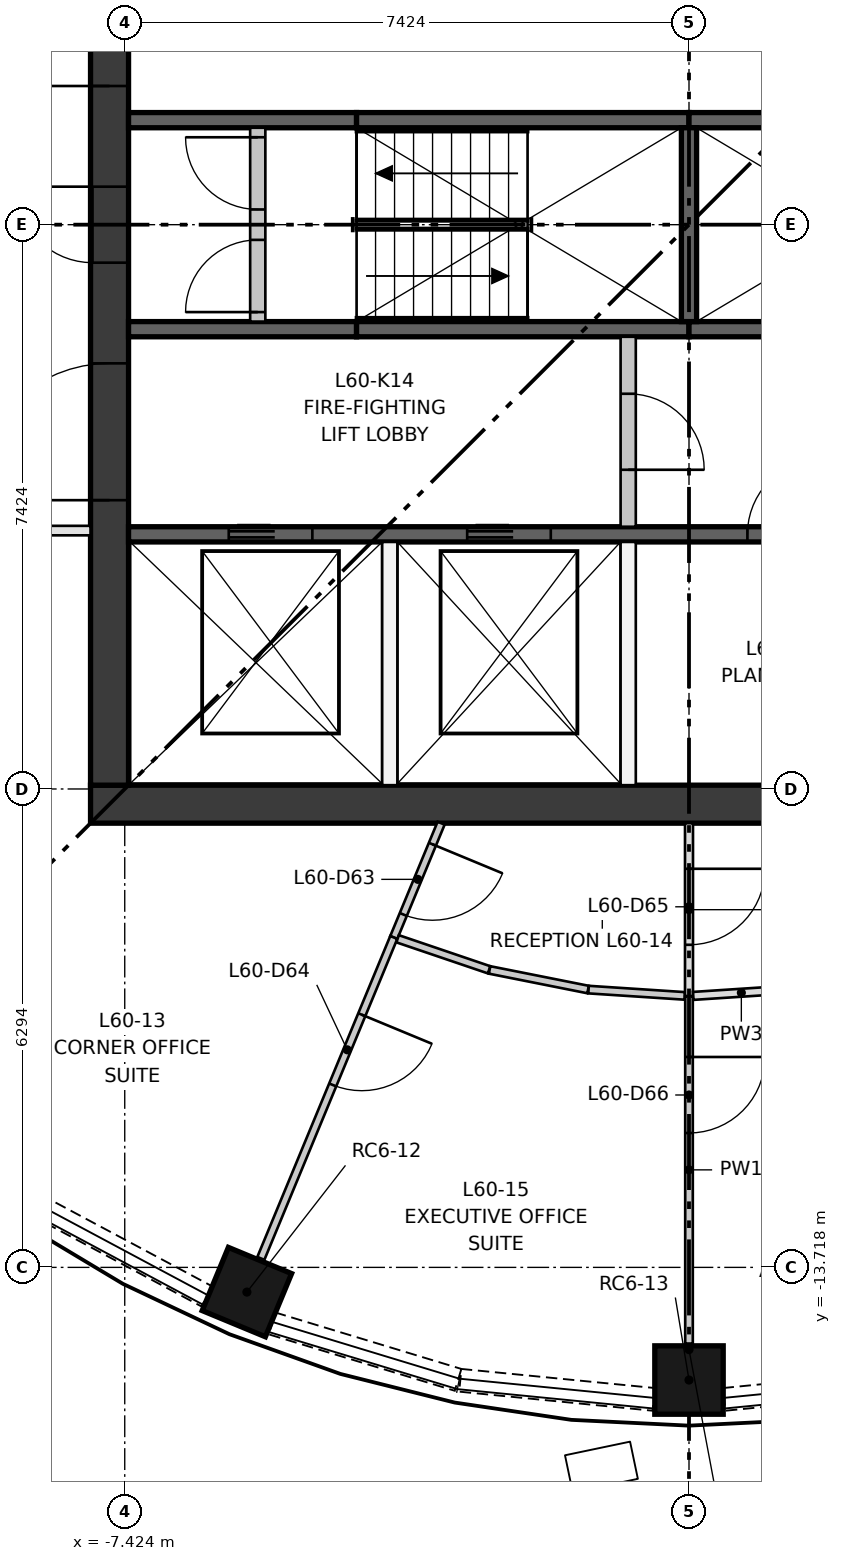
"""IFC4 building model, lengths in metres.
Left out: names, types, materials, properties, quantities, classifications, styles, units other than length and angle.
Written with IfcOpenShell. Run it as: python <this file> out.ifc"""

import sys

from ifc_helpers import new_model, si_unit, direction, frame, frame_2d, origin, origin_2d, place, context, subcontext, project, spatial, rectangle, extrude, element, fill, save


model = new_model("IFC4")
c1 = context("Model", 3, precision=1e-05, world=origin(), true_north=direction((0.0, 1.0)))
c2 = subcontext(c1, "Body", "Model", "MODEL_VIEW")
j1 = project(units=[si_unit("LENGTHUNIT", "METRE"), si_unit("PLANEANGLEUNIT", "RADIAN")], contexts=[c1])
p1 = place(None, origin())
s1 = spatial("IfcSite", under=j1, at=p1, CompositionType="ELEMENT")
p2 = place(p1, origin())
s2 = spatial("IfcBuilding", under=s1, at=p2, CompositionType="ELEMENT")
p3 = place(p2, frame((0.0, 0.0, 221.15)))
s3 = spatial("IfcBuildingStorey", under=s2, at=p3, CompositionType="ELEMENT", Elevation=221.15)
for number, where, z_axis, x_axis in (
    (1, (-5.817, -14.043, 0.0), (0.0, 0.0, 1.0), (-0.383, -0.924, 0.0)),
    (2, (0.0, -15.2, 0.0), (0.0, 0.0, 1.0), (0.0, -1.0, 0.0)),
):
    element("IfcColumn", number, at=place(p3, frame(where, z_axis=z_axis, x_axis=x_axis)), inside=s3, PredefinedType="COLUMN", context=c2, shape_type="SweptSolid", body=[
        extrude(rectangle(XDim=0.9, YDim=0.9, at=origin_2d()), origin(), (0.0, 0.0, 1.0), 2.85),
    ])
p4 = place(p3, frame((-7.874, -7.624, 0.0), z_axis=(0.0, 0.0, 1.0), x_axis=(1.0, 0.0, 0.0)))
e3 = element("IfcWall", 3, at=p4, inside=s3, PredefinedType="SHEAR", context=c2, shape_type="SweptSolid", body=[
    extrude(rectangle(XDim=15.748, YDim=0.5, at=frame_2d((7.874, 0.0))), origin(), (0.0, 0.0, 1.0), 3.35),
])
p5 = place(p3, frame((-7.624, -7.374, 0.0), z_axis=(0.0, 0.0, 1.0), x_axis=(0.0, 1.0, 0.0)))
e4 = element("IfcWall", 4, at=p5, inside=s3, PredefinedType="SHEAR", context=c2, shape_type="SweptSolid", body=[
    extrude(rectangle(XDim=14.748, YDim=0.5, at=frame_2d((7.374, 0.0))), origin(), (0.0, 0.0, 1.0), 3.35),
])
p6 = place(p5, frame((6.874, 0.0, 0.0)))
e5 = element("IfcOpeningElement", 5, at=p6, cuts=e4, PredefinedType="OPENING", context=c2, shape_type="SweptSolid", body=[
    extrude(rectangle(XDim=1.0, YDim=2.1, at=frame_2d((0.5, 1.05))), frame((0.0, 0.26, 0.0), z_axis=(0.0, -1.0, 0.0), x_axis=(1.0, 0.0, 0.0)), (0.0, 0.0, 1.0), 0.52),
])
p7 = place(p5, frame((3.75, 0.0, 0.0)))
e6 = element("IfcOpeningElement", 6, at=p7, cuts=e4, PredefinedType="OPENING", context=c2, shape_type="SweptSolid", body=[
    extrude(rectangle(XDim=1.8, YDim=2.1, at=frame_2d((0.9, 1.05))), frame((0.0, 0.26, 0.0), z_axis=(0.0, -1.0, 0.0), x_axis=(1.0, 0.0, 0.0)), (0.0, 0.0, 1.0), 0.52),
])
p8 = place(p5, frame((9.198, 0.0, 0.0)))
e7 = element("IfcOpeningElement", 7, at=p8, cuts=e4, PredefinedType="OPENING", context=c2, shape_type="SweptSolid", body=[
    extrude(rectangle(XDim=1.8, YDim=2.1, at=frame_2d((0.9, 1.05))), frame((0.0, 0.26, 0.0), z_axis=(0.0, -1.0, 0.0), x_axis=(1.0, 0.0, 0.0)), (0.0, 0.0, 1.0), 0.52),
])
p9 = place(p3, frame((-7.374, -4.074, 0.0), z_axis=(0.0, 0.0, 1.0), x_axis=(1.0, 0.0, 0.0)))
e8 = element("IfcWall", 8, at=p9, inside=s3, PredefinedType="SHEAR", context=c2, shape_type="SweptSolid", body=[
    extrude(rectangle(XDim=14.748, YDim=0.2, at=frame_2d((7.374, 0.0))), origin(), (0.0, 0.0, 1.0), 3.0),
])
p10 = place(p9, frame((1.319, 0.0, 0.0)))
e9 = element("IfcOpeningElement", 9, at=p10, cuts=e8, PredefinedType="OPENING", context=c2, shape_type="SweptSolid", body=[
    extrude(rectangle(XDim=1.1, YDim=2.1, at=frame_2d((0.55, 1.05))), frame((0.0, 0.11, 0.0), z_axis=(0.0, -1.0, 0.0), x_axis=(1.0, 0.0, 0.0)), (0.0, 0.0, 1.0), 0.22),
])
p11 = place(p9, frame((4.456, 0.0, 0.0)))
e10 = element("IfcOpeningElement", 10, at=p11, cuts=e8, PredefinedType="OPENING", context=c2, shape_type="SweptSolid", body=[
    extrude(rectangle(XDim=1.1, YDim=2.1, at=frame_2d((0.55, 1.05))), frame((0.0, 0.11, 0.0), z_axis=(0.0, -1.0, 0.0), x_axis=(1.0, 0.0, 0.0)), (0.0, 0.0, 1.0), 0.22),
])
p12 = place(p9, frame((8.143, 0.0, 0.0)))
e11 = element("IfcOpeningElement", 11, at=p12, cuts=e8, PredefinedType="OPENING", context=c2, shape_type="SweptSolid", body=[
    extrude(rectangle(XDim=1.0, YDim=2.1, at=frame_2d((0.5, 1.05))), frame((0.0, 0.11, 0.0), z_axis=(0.0, -1.0, 0.0), x_axis=(1.0, 0.0, 0.0)), (0.0, 0.0, 1.0), 0.22),
])
p13 = place(p9, frame((12.379, 0.0, 0.0)))
e12 = element("IfcOpeningElement", 12, at=p13, cuts=e8, PredefinedType="OPENING", context=c2, shape_type="SweptSolid", body=[
    extrude(rectangle(XDim=0.8, YDim=2.1, at=frame_2d((0.4, 1.05))), frame((0.0, 0.11, 0.0), z_axis=(0.0, -1.0, 0.0), x_axis=(1.0, 0.0, 0.0)), (0.0, 0.0, 1.0), 0.22),
])
p14 = place(p3, frame((-7.374, -1.375, 0.0), z_axis=(0.0, 0.0, 1.0), x_axis=(1.0, 0.0, 0.0)))
e13 = element("IfcWall", 13, at=p14, inside=s3, PredefinedType="SHEAR", context=c2, shape_type="SweptSolid", body=[
    extrude(rectangle(XDim=3.0, YDim=0.2, at=frame_2d((1.5, 0.0))), origin(), (0.0, 0.0, 1.0), 3.0),
])
for number, where, z_axis, x_axis in (
    (14, (-4.374, -1.375, 0.0), (0.0, 0.0, 1.0), (1.0, 0.0, 0.0)),
    (15, (0.0, -1.375, 0.0), (0.0, 0.0, 1.0), (1.0, 0.0, 0.0)),
):
    element("IfcWall", number, at=place(p3, frame(where, z_axis=z_axis, x_axis=x_axis)), inside=s3, PredefinedType="SHEAR", context=c2, shape_type="SweptSolid", body=[
        extrude(rectangle(XDim=4.374, YDim=0.2, at=frame_2d((2.187, 0.0))), origin(), (0.0, 0.0, 1.0), 3.0),
    ])
p15 = place(p3, frame((-7.374, 1.375, 0.0), z_axis=(0.0, 0.0, 1.0), x_axis=(1.0, 0.0, 0.0)))
e16 = element("IfcWall", 16, at=p15, inside=s3, PredefinedType="SHEAR", context=c2, shape_type="SweptSolid", body=[
    extrude(rectangle(XDim=3.0, YDim=0.2, at=frame_2d((1.5, 0.0))), origin(), (0.0, 0.0, 1.0), 3.0),
])
for number, where, z_axis, x_axis in (
    (17, (-4.374, 1.375, 0.0), (0.0, 0.0, 1.0), (1.0, 0.0, 0.0)),
    (18, (0.0, 1.375, 0.0), (0.0, 0.0, 1.0), (1.0, 0.0, 0.0)),
):
    element("IfcWall", number, at=place(p3, frame(where, z_axis=z_axis, x_axis=x_axis)), inside=s3, PredefinedType="SHEAR", context=c2, shape_type="SweptSolid", body=[
        extrude(rectangle(XDim=4.374, YDim=0.2, at=frame_2d((2.187, 0.0))), origin(), (0.0, 0.0, 1.0), 3.0),
    ])
p16 = place(p3, frame((0.0, -1.275, 0.0), z_axis=(0.0, 0.0, 1.0), x_axis=(0.0, 1.0, 0.0)))
e19 = element("IfcWall", 19, at=p16, inside=s3, PredefinedType="SHEAR", context=c2, shape_type="SweptSolid", body=[
    extrude(rectangle(XDim=2.55, YDim=0.2, at=frame_2d((1.275, 0.0))), origin(), (0.0, 0.0, 1.0), 3.0),
])
for number, where, z_axis, x_axis in (
    (20, (-3.937, -7.374, 0.0), (0.0, 0.0, 1.0), (0.0, 1.0, 0.0)),
    (21, (-0.8, -7.374, 0.0), (0.0, 0.0, 1.0), (0.0, 1.0, 0.0)),
):
    element("IfcWall", number, at=place(p3, frame(where, z_axis=z_axis, x_axis=x_axis)), inside=s3, PredefinedType="PARTITIONING", context=c2, shape_type="SweptSolid", body=[
        extrude(rectangle(XDim=3.2, YDim=0.2, at=frame_2d((1.6, 0.0))), origin(), (0.0, 0.0, 1.0), 3.0),
    ])
p17 = place(p3, frame((-0.8, -3.974, 0.0), z_axis=(0.0, 0.0, 1.0), x_axis=(0.0, 1.0, 0.0)))
e22 = element("IfcWall", 22, at=p17, inside=s3, PredefinedType="PARTITIONING", context=c2, shape_type="SweptSolid", body=[
    extrude(rectangle(XDim=2.499, YDim=0.2, at=frame_2d((1.25, 0.0))), origin(), (0.0, 0.0, 1.0), 3.0),
])
p18 = place(p17, frame((0.75, 0.0, 0.0)))
e23 = element("IfcOpeningElement", 23, at=p18, cuts=e22, PredefinedType="OPENING", context=c2, shape_type="SweptSolid", body=[
    extrude(rectangle(XDim=1.0, YDim=2.1, at=frame_2d((0.5, 1.05))), frame((0.0, 0.11, 0.0), z_axis=(0.0, -1.0, 0.0), x_axis=(1.0, 0.0, 0.0)), (0.0, 0.0, 1.0), 0.22),
])
p19 = place(p3, frame((-5.674, -1.275, 0.0), z_axis=(0.0, 0.0, 1.0), x_axis=(0.0, 1.0, 0.0)))
e24 = element("IfcWall", 24, at=p19, inside=s3, PredefinedType="PARTITIONING", context=c2, shape_type="SweptSolid", body=[
    extrude(rectangle(XDim=2.55, YDim=0.2, at=frame_2d((1.275, 0.0))), origin(), (0.0, 0.0, 1.0), 3.0),
])
p20 = place(p19, frame((0.125, 0.0, 0.0)))
e25 = element("IfcOpeningElement", 25, at=p20, cuts=e24, PredefinedType="OPENING", context=c2, shape_type="SweptSolid", body=[
    extrude(rectangle(XDim=0.95, YDim=2.1, at=frame_2d((0.475, 1.05))), frame((0.0, 0.11, 0.0), z_axis=(0.0, -1.0, 0.0), x_axis=(1.0, 0.0, 0.0)), (0.0, 0.0, 1.0), 0.22),
])
p21 = place(p19, frame((1.475, 0.0, 0.0)))
e26 = element("IfcOpeningElement", 26, at=p21, cuts=e24, PredefinedType="OPENING", context=c2, shape_type="SweptSolid", body=[
    extrude(rectangle(XDim=0.95, YDim=2.1, at=frame_2d((0.475, 1.05))), frame((0.0, 0.11, 0.0), z_axis=(0.0, -1.0, 0.0), x_axis=(1.0, 0.0, 0.0)), (0.0, 0.0, 1.0), 0.22),
])
p22 = place(p3, frame((-8.598, -12.894, 0.0), z_axis=(0.0, 0.0, 1.0), x_axis=(0.881810499649, -0.471603904468, 0.0)))
e27 = element("IfcWall", 27, at=p22, inside=s3, PredefinedType="SOLIDWALL", context=c2, shape_type="SweptSolid", body=[
    extrude(rectangle(XDim=2.557, YDim=0.3, at=frame_2d((1.278, 0.0))), origin(), (0.0, 0.0, 1.0), 0.9),
])
p23 = place(p3, frame((-5.486, -14.455, 0.0), z_axis=(0.0, 0.0, 1.0), x_axis=(0.956960147557, -0.290219358397, 0.0)))
e28 = element("IfcWall", 28, at=p23, inside=s3, PredefinedType="SOLIDWALL", context=c2, shape_type="SweptSolid", body=[
    extrude(rectangle(XDim=2.557, YDim=0.3, at=frame_2d((1.279, 0.0))), origin(), (0.0, 0.0, 1.0), 0.9),
])
for number, where, z_axis, x_axis in (
    (29, (-3.009, -15.204, 0.0), (0.0, 0.0, 1.0), (0.995, -0.098, 0.0)),
    (30, (0.464, -15.455, 0.0), (0.0, 0.0, 1.0), (0.995, 0.098, 0.0)),
):
    element("IfcWall", number, at=place(p3, frame(where, z_axis=z_axis, x_axis=x_axis)), inside=s3, PredefinedType="SOLIDWALL", context=c2, shape_type="SweptSolid", body=[
        extrude(rectangle(XDim=2.558, YDim=0.3, at=frame_2d((1.279, 0.0))), origin(), (0.0, 0.0, 1.0), 0.9),
    ])
p24 = place(p3, frame((-7.874, -4.024, 0.0), z_axis=(0.0, 0.0, 1.0), x_axis=(-1.0, 0.0, 0.0)))
e31 = element("IfcWall", 31, at=p24, inside=s3, PredefinedType="PARTITIONING", context=c2, shape_type="SweptSolid", body=[
    extrude(rectangle(XDim=2.422, YDim=0.125, at=frame_2d((1.211, 0.0))), origin(), (0.0, 0.0, 1.0), 3.0),
])
p25 = place(p24, frame((0.7, 0.0, 0.0)))
e32 = element("IfcOpeningElement", 32, at=p25, cuts=e31, PredefinedType="OPENING", context=c2, shape_type="SweptSolid", body=[
    extrude(rectangle(XDim=1.0, YDim=2.1, at=frame_2d((0.5, 1.05))), frame((0.0, 0.073, 0.0), z_axis=(0.0, -1.0, 0.0), x_axis=(1.0, 0.0, 0.0)), (0.0, 0.0, 1.0), 0.145),
])
p26 = place(p3, frame((-3.261, -7.874, 0.0), z_axis=(0.0, 0.0, 1.0), x_axis=(-0.382718376354, -0.923865057463, 0.0)))
e33 = element("IfcWall", 33, at=p26, inside=s3, PredefinedType="PARTITIONING", context=c2, shape_type="SweptSolid", body=[
    extrude(rectangle(XDim=1.627, YDim=0.1, at=frame_2d((0.813, 0.0))), origin(), (0.0, 0.0, 1.0), 3.0),
])
p27 = place(p26, frame((0.3, 0.0, 0.0)))
e34 = element("IfcOpeningElement", 34, at=p27, cuts=e33, PredefinedType="OPENING", context=c2, shape_type="SweptSolid", body=[
    extrude(rectangle(XDim=1.0, YDim=2.1, at=frame_2d((0.5, 1.05))), frame((0.0, 0.06, 0.0), z_axis=(0.0, -1.0, 0.0), x_axis=(1.0, 0.0, 0.0)), (0.0, 0.0, 1.0), 0.12),
])
p28 = place(p3, frame((-3.884, -9.377, 0.0), z_axis=(0.0, 0.0, 1.0), x_axis=(-0.382664766489, -0.923887263949, 0.0)))
e35 = element("IfcWall", 35, at=p28, inside=s3, PredefinedType="PARTITIONING", context=c2, shape_type="SweptSolid", body=[
    extrude(rectangle(XDim=4.57, YDim=0.1, at=frame_2d((2.285, 0.0))), origin(), (0.0, 0.0, 1.0), 3.0),
])
p29 = place(p28, frame((1.1, 0.0, 0.0)))
e36 = element("IfcOpeningElement", 36, at=p29, cuts=e35, PredefinedType="OPENING", context=c2, shape_type="SweptSolid", body=[
    extrude(rectangle(XDim=1.0, YDim=2.1, at=frame_2d((0.5, 1.05))), frame((0.0, 0.06, 0.0), z_axis=(0.0, -1.0, 0.0), x_axis=(1.0, 0.0, 0.0)), (0.0, 0.0, 1.0), 0.12),
])
p30 = place(p3, frame((-2.63, -9.803, 0.0), z_axis=(0.0, 0.0, 1.0), x_axis=(-0.946940072487, 0.321410172706, 0.0)))
e37 = element("IfcWall", 37, at=p30, inside=s3, PredefinedType="PARTITIONING", context=c2, shape_type="SweptSolid", body=[
    extrude(rectangle(XDim=1.271, YDim=0.1, at=frame_2d((0.635, 0.0))), origin(), (0.0, 0.0, 1.0), 3.0),
])
p31 = place(p3, frame((-1.328, -10.062, 0.0), z_axis=(0.0, 0.0, 1.0), x_axis=(-0.980779158075, 0.195121098517, 0.0)))
e38 = element("IfcWall", 38, at=p31, inside=s3, PredefinedType="PARTITIONING", context=c2, shape_type="SweptSolid", body=[
    extrude(rectangle(XDim=1.321, YDim=0.1, at=frame_2d((0.661, 0.0))), origin(), (0.0, 0.0, 1.0), 3.0),
])
p32 = place(p3, frame((-0.056, -10.146, 0.0), z_axis=(0.0, 0.0, 1.0), x_axis=(-0.997868677089, 0.065254143814, 0.0)))
e39 = element("IfcWall", 39, at=p32, inside=s3, PredefinedType="PARTITIONING", context=c2, shape_type="SweptSolid", body=[
    extrude(rectangle(XDim=1.268, YDim=0.1, at=frame_2d((0.634, 0.0))), origin(), (0.0, 0.0, 1.0), 3.0),
])
p33 = place(p3, frame((0.0, -7.874, 0.0), z_axis=(0.0, 0.0, 1.0), x_axis=(0.0, -1.0, 0.0)))
e40 = element("IfcWall", 40, at=p33, inside=s3, PredefinedType="PARTITIONING", context=c2, shape_type="SweptSolid", body=[
    extrude(rectangle(XDim=2.276, YDim=0.105, at=frame_2d((1.138, 0.0))), origin(), (0.0, 0.0, 1.0), 3.0),
])
p34 = place(p33, frame((0.6, 0.0, 0.0)))
e41 = element("IfcOpeningElement", 41, at=p34, cuts=e40, PredefinedType="OPENING", context=c2, shape_type="SweptSolid", body=[
    extrude(rectangle(XDim=1.0, YDim=2.1, at=frame_2d((0.5, 1.05))), frame((0.0, 0.062, 0.0), z_axis=(0.0, -1.0, 0.0), x_axis=(1.0, 0.0, 0.0)), (0.0, 0.0, 1.0), 0.125),
])
p35 = place(p3, frame((0.0, -10.15, 0.0), z_axis=(0.0, 0.0, 1.0), x_axis=(0.0, -1.0, 0.0)))
e42 = element("IfcWall", 42, at=p35, inside=s3, PredefinedType="PARTITIONING", context=c2, shape_type="SweptSolid", body=[
    extrude(rectangle(XDim=4.57, YDim=0.1, at=frame_2d((2.285, 0.0))), origin(), (0.0, 0.0, 1.0), 3.0),
])
p36 = place(p35, frame((0.8, 0.0, 0.0)))
e43 = element("IfcOpeningElement", 43, at=p36, cuts=e42, PredefinedType="OPENING", context=c2, shape_type="SweptSolid", body=[
    extrude(rectangle(XDim=1.0, YDim=2.1, at=frame_2d((0.5, 1.05))), frame((0.0, 0.06, 0.0), z_axis=(0.0, -1.0, 0.0), x_axis=(1.0, 0.0, 0.0)), (0.0, 0.0, 1.0), 0.12),
])
p37 = place(p3, frame((1.321, -10.063, 0.0), z_axis=(0.0, 0.0, 1.0), x_axis=(-0.99786785721, -0.065266680223, 0.0)))
e44 = element("IfcWall", 44, at=p37, inside=s3, PredefinedType="PARTITIONING", context=c2, shape_type="SweptSolid", body=[
    extrude(rectangle(XDim=1.268, YDim=0.105, at=frame_2d((0.634, 0.0))), origin(), (0.0, 0.0, 1.0), 3.0),
])
p38 = place(p10, origin())
e45 = element("IfcDoor", 45, at=p38, inside=s3, OperationType="DOUBLE_DOOR_SLIDING", PredefinedType="DOOR", context=c2, shape_type="SweptSolid", body=[
    extrude(rectangle(XDim=1.1, YDim=2.1, at=frame_2d((0.55, 1.05))), frame((0.0, 0.025, 0.0), z_axis=(0.0, -1.0, 0.0), x_axis=(1.0, 0.0, 0.0)), (0.0, 0.0, 1.0), 0.05),
])
fill(e9, e45)
p39 = place(p11, origin())
e46 = element("IfcDoor", 46, at=p39, inside=s3, OperationType="DOUBLE_DOOR_SLIDING", PredefinedType="DOOR", context=c2, shape_type="SweptSolid", body=[
    extrude(rectangle(XDim=1.1, YDim=2.1, at=frame_2d((0.55, 1.05))), frame((0.0, 0.025, 0.0), z_axis=(0.0, -1.0, 0.0), x_axis=(1.0, 0.0, 0.0)), (0.0, 0.0, 1.0), 0.05),
])
fill(e10, e46)
p40 = place(p20, origin())
e47 = element("IfcDoor", 47, at=p40, inside=s3, OperationType="SINGLE_SWING_LEFT", PredefinedType="DOOR", context=c2, shape_type="SweptSolid", body=[
    extrude(rectangle(XDim=0.95, YDim=2.1, at=frame_2d((0.475, 1.05))), frame((0.0, 0.025, 0.0), z_axis=(0.0, -1.0, 0.0), x_axis=(1.0, 0.0, 0.0)), (0.0, 0.0, 1.0), 0.05),
])
fill(e25, e47)
p41 = place(p21, origin())
e48 = element("IfcDoor", 48, at=p41, inside=s3, OperationType="SINGLE_SWING_RIGHT", PredefinedType="DOOR", context=c2, shape_type="SweptSolid", body=[
    extrude(rectangle(XDim=0.95, YDim=2.1, at=frame_2d((0.475, 1.05))), frame((0.0, 0.025, 0.0), z_axis=(0.0, -1.0, 0.0), x_axis=(1.0, 0.0, 0.0)), (0.0, 0.0, 1.0), 0.05),
])
fill(e26, e48)
p42 = place(p18, frame((1.0, 0.0, 0.0), z_axis=(0.0, 0.0, 1.0), x_axis=(-1.0, 0.0, 0.0)))
e49 = element("IfcDoor", 49, at=p42, inside=s3, OperationType="SINGLE_SWING_LEFT", PredefinedType="DOOR", context=c2, shape_type="SweptSolid", body=[
    extrude(rectangle(XDim=1.0, YDim=2.1, at=frame_2d((0.5, 1.05))), frame((0.0, 0.025, 0.0), z_axis=(0.0, -1.0, 0.0), x_axis=(1.0, 0.0, 0.0)), (0.0, 0.0, 1.0), 0.05),
])
fill(e23, e49)
p43 = place(p12, origin())
e50 = element("IfcDoor", 50, at=p43, inside=s3, OperationType="SINGLE_SWING_RIGHT", PredefinedType="DOOR", context=c2, shape_type="SweptSolid", body=[
    extrude(rectangle(XDim=1.0, YDim=2.1, at=frame_2d((0.5, 1.05))), frame((0.0, 0.025, 0.0), z_axis=(0.0, -1.0, 0.0), x_axis=(1.0, 0.0, 0.0)), (0.0, 0.0, 1.0), 0.05),
])
fill(e11, e50)
p44 = place(p6, origin())
e51 = element("IfcDoor", 51, at=p44, inside=s3, OperationType="SINGLE_SWING_RIGHT", PredefinedType="DOOR", context=c2, shape_type="SweptSolid", body=[
    extrude(rectangle(XDim=1.0, YDim=2.1, at=frame_2d((0.5, 1.05))), frame((0.0, 0.25, 0.0), z_axis=(0.0, -1.0, 0.0), x_axis=(1.0, 0.0, 0.0)), (0.0, 0.0, 1.0), 0.05),
])
fill(e5, e51)
p45 = place(p7, origin())
e52 = element("IfcDoor", 52, at=p45, inside=s3, OperationType="DOUBLE_DOOR_SINGLE_SWING", PredefinedType="DOOR", context=c2, shape_type="SweptSolid", body=[
    extrude(rectangle(XDim=1.8, YDim=2.1, at=frame_2d((0.9, 1.05))), frame((0.0, 0.025, 0.0), z_axis=(0.0, -1.0, 0.0), x_axis=(1.0, 0.0, 0.0)), (0.0, 0.0, 1.0), 0.05),
])
fill(e6, e52)
p46 = place(p8, origin())
e53 = element("IfcDoor", 53, at=p46, inside=s3, OperationType="DOUBLE_DOOR_SINGLE_SWING", PredefinedType="DOOR", context=c2, shape_type="SweptSolid", body=[
    extrude(rectangle(XDim=1.8, YDim=2.1, at=frame_2d((0.9, 1.05))), frame((0.0, 0.025, 0.0), z_axis=(0.0, -1.0, 0.0), x_axis=(1.0, 0.0, 0.0)), (0.0, 0.0, 1.0), 0.05),
])
fill(e7, e53)
p47 = place(p27, origin())
e54 = element("IfcDoor", 54, at=p47, inside=s3, OperationType="SINGLE_SWING_LEFT", PredefinedType="DOOR", context=c2, shape_type="SweptSolid", body=[
    extrude(rectangle(XDim=1.0, YDim=2.1, at=frame_2d((0.5, 1.05))), frame((0.0, 0.025, 0.0), z_axis=(0.0, -1.0, 0.0), x_axis=(1.0, 0.0, 0.0)), (0.0, 0.0, 1.0), 0.05),
])
fill(e34, e54)
p48 = place(p29, origin())
e55 = element("IfcDoor", 55, at=p48, inside=s3, OperationType="SINGLE_SWING_LEFT", PredefinedType="DOOR", context=c2, shape_type="SweptSolid", body=[
    extrude(rectangle(XDim=1.0, YDim=2.1, at=frame_2d((0.5, 1.05))), frame((0.0, 0.025, 0.0), z_axis=(0.0, -1.0, 0.0), x_axis=(1.0, 0.0, 0.0)), (0.0, 0.0, 1.0), 0.05),
])
fill(e36, e55)
p49 = place(p34, origin())
e56 = element("IfcDoor", 56, at=p49, inside=s3, OperationType="SINGLE_SWING_LEFT", PredefinedType="DOOR", context=c2, shape_type="SweptSolid", body=[
    extrude(rectangle(XDim=1.0, YDim=2.1, at=frame_2d((0.5, 1.05))), frame((0.0, 0.025, 0.0), z_axis=(0.0, -1.0, 0.0), x_axis=(1.0, 0.0, 0.0)), (0.0, 0.0, 1.0), 0.05),
])
fill(e41, e56)
p50 = place(p36, origin())
e57 = element("IfcDoor", 57, at=p50, inside=s3, OperationType="SINGLE_SWING_LEFT", PredefinedType="DOOR", context=c2, shape_type="SweptSolid", body=[
    extrude(rectangle(XDim=1.0, YDim=2.1, at=frame_2d((0.5, 1.05))), frame((0.0, 0.025, 0.0), z_axis=(0.0, -1.0, 0.0), x_axis=(1.0, 0.0, 0.0)), (0.0, 0.0, 1.0), 0.05),
])
fill(e43, e57)
save(model, sys.argv[1])
